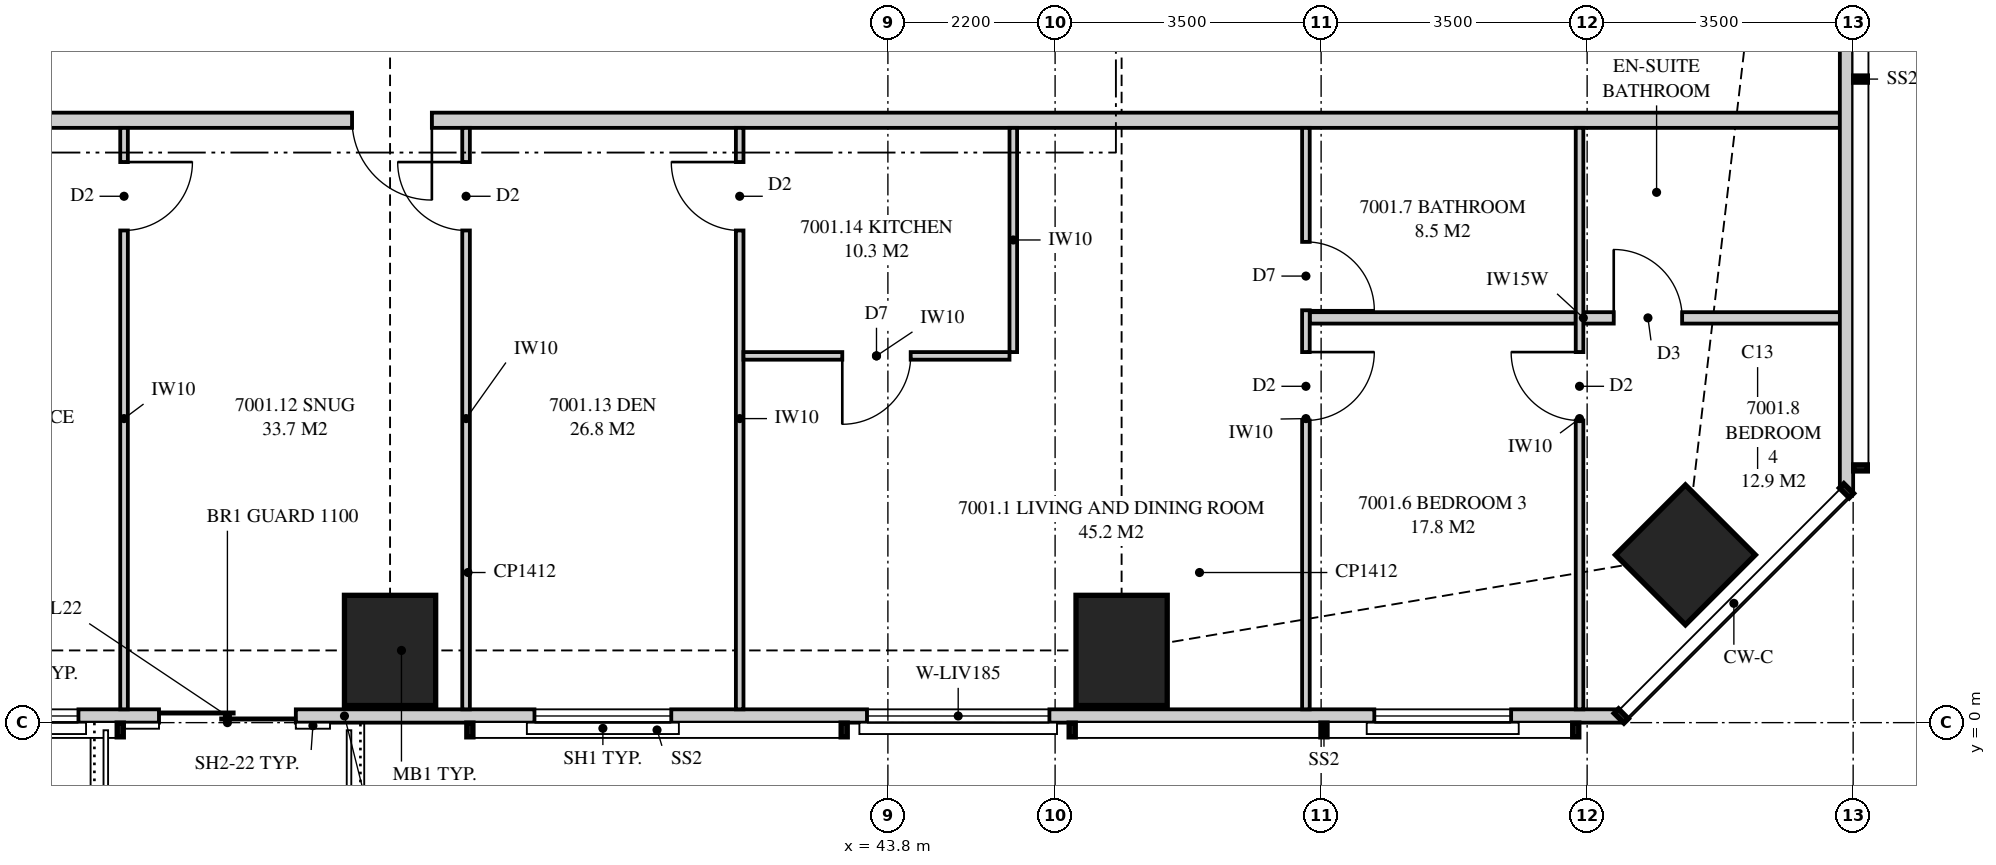
"""IFC4 building model, lengths in metres.
Left out: names, types, materials, properties, quantities, classifications, styles, units other than length and angle.
Written with IfcOpenShell. Run it as: python <this file> out.ifc"""

import sys

from ifc_helpers import new_model, si_unit, direction, frame, frame_2d, origin, origin_2d, place, context, subcontext, project, spatial, polyline, rectangle, outline, extrude, element, fill, save


model = new_model("IFC4")
c1 = context("Model", 3, precision=1e-05, world=origin(), true_north=direction((0.0, 1.0)))
c2 = subcontext(c1, "Body", "Model", "MODEL_VIEW")
j1 = project(units=[si_unit("LENGTHUNIT", "METRE"), si_unit("PLANEANGLEUNIT", "RADIAN")], contexts=[c1])
p1 = place(None, origin())
s1 = spatial("IfcSite", under=j1, at=p1, CompositionType="ELEMENT")
p2 = place(p1, origin())
s2 = spatial("IfcBuilding", under=s1, at=p2, CompositionType="ELEMENT")
p3 = place(p2, frame((0.0, 0.0, 256.45)))
s3 = spatial("IfcBuildingStorey", under=s2, at=p3, CompositionType="ELEMENT", Elevation=256.45)
for number, where, z_axis, x_axis in (
    (1, (37.25, 0.95, 0.0), (0.0, 0.0, 1.0), (0.0, 1.0, 0.0)),
    (2, (46.875, 0.95, 0.0), (0.0, 0.0, 1.0), (0.0, 1.0, 0.0)),
):
    element("IfcColumn", number, at=place(p3, frame(where, z_axis=z_axis, x_axis=x_axis)), inside=s3, PredefinedType="COLUMN", context=c2, shape_type="SweptSolid", body=[
        extrude(rectangle(XDim=1.45, YDim=1.2, at=origin_2d()), origin(), (0.0, 0.0, 1.0), 3.5),
    ])
p4 = place(p3, frame((54.293, 2.207, 0.0), z_axis=(0.0, 0.0, 1.0), x_axis=(0.707106781187, 0.707106781187, 0.0)))
e3 = element("IfcColumn", 3, at=p4, inside=s3, PredefinedType="COLUMN", context=c2, shape_type="SweptSolid", body=[
    extrude(rectangle(XDim=1.3, YDim=1.3, at=origin_2d()), origin(), (0.0, 0.0, 1.0), 3.5),
])
p5 = place(p3, frame((19.851, 0.087, 0.0), z_axis=(0.0, 0.0, 1.0), x_axis=(1.0, 0.0, 0.0)))
e4 = element("IfcWall", 4, at=p5, inside=s3, PredefinedType="SOLIDWALL", context=c2, shape_type="SweptSolid", body=[
    extrude(outline(polyline([(0.0, 0.0), (33.597, 0.0), (33.597, 3.26), (27.239, 3.26), (27.239, 2.3), (27.155, 2.3), (27.155, 3.26), (27.024, 3.26), (27.024, 2.3), (7.774, 2.3), (7.774, 3.26), (7.642, 3.26), (7.642, 2.3), (7.559, 2.3), (7.559, 3.26), (0.0, 3.26), (0.0, 0.0)])), frame((0.0, 0.087, 0.0), z_axis=(0.0, -1.0, 0.0), x_axis=(1.0, 0.0, 0.0)), (0.0, 0.0, 1.0), 0.175),
])
p6 = place(p5, frame((2.649, 0.0, 0.4)))
e5 = element("IfcOpeningElement", 5, at=p6, cuts=e4, PredefinedType="OPENING", context=c2, shape_type="SweptSolid", body=[
    extrude(rectangle(XDim=1.8, YDim=1.85, at=frame_2d((0.9, 0.925))), frame((0.0, 0.097, 0.0), z_axis=(0.0, -1.0, 0.0), x_axis=(1.0, 0.0, 0.0)), (0.0, 0.0, 1.0), 0.195),
])
p7 = place(p5, frame((8.625, 0.0, 0.4)))
e6 = element("IfcOpeningElement", 6, at=p7, cuts=e4, PredefinedType="OPENING", context=c2, shape_type="SweptSolid", body=[
    extrude(rectangle(XDim=1.8, YDim=1.85, at=frame_2d((0.9, 0.925))), frame((0.0, 0.097, 0.0), z_axis=(0.0, -1.0, 0.0), x_axis=(1.0, 0.0, 0.0)), (0.0, 0.0, 1.0), 0.195),
])
p8 = place(p5, frame((11.499, 0.0, 0.4)))
e7 = element("IfcOpeningElement", 7, at=p8, cuts=e4, PredefinedType="OPENING", context=c2, shape_type="SweptSolid", body=[
    extrude(rectangle(XDim=1.8, YDim=1.85, at=frame_2d((0.9, 0.925))), frame((0.0, 0.097, 0.0), z_axis=(0.0, -1.0, 0.0), x_axis=(1.0, 0.0, 0.0)), (0.0, 0.0, 1.0), 0.195),
])
p9 = place(p5, frame((14.359, 0.0, 0.0)))
e8 = element("IfcOpeningElement", 8, at=p9, cuts=e4, PredefinedType="OPENING", context=c2, shape_type="SweptSolid", body=[
    extrude(rectangle(XDim=1.8, YDim=2.25, at=frame_2d((0.9, 1.125))), frame((0.0, 0.097, 0.0), z_axis=(0.0, -1.0, 0.0), x_axis=(1.0, 0.0, 0.0)), (0.0, 0.0, 1.0), 0.195),
])
p10 = place(p5, frame((19.299, 0.0, 0.4)))
e9 = element("IfcOpeningElement", 9, at=p10, cuts=e4, PredefinedType="OPENING", context=c2, shape_type="SweptSolid", body=[
    extrude(rectangle(XDim=1.8, YDim=1.85, at=frame_2d((0.9, 0.925))), frame((0.0, 0.097, 0.0), z_axis=(0.0, -1.0, 0.0), x_axis=(1.0, 0.0, 0.0)), (0.0, 0.0, 1.0), 0.195),
])
p11 = place(p5, frame((23.674, 0.0, 0.4)))
e10 = element("IfcOpeningElement", 10, at=p11, cuts=e4, PredefinedType="OPENING", context=c2, shape_type="SweptSolid", body=[
    extrude(rectangle(XDim=2.4, YDim=1.85, at=frame_2d((1.2, 0.925))), frame((0.0, 0.097, 0.0), z_axis=(0.0, -1.0, 0.0), x_axis=(1.0, 0.0, 0.0)), (0.0, 0.0, 1.0), 0.195),
])
p12 = place(p5, frame((30.349, 0.0, 0.4)))
e11 = element("IfcOpeningElement", 11, at=p12, cuts=e4, PredefinedType="OPENING", context=c2, shape_type="SweptSolid", body=[
    extrude(rectangle(XDim=1.8, YDim=1.85, at=frame_2d((0.9, 0.925))), frame((0.0, 0.097, 0.0), z_axis=(0.0, -1.0, 0.0), x_axis=(1.0, 0.0, 0.0)), (0.0, 0.0, 1.0), 0.195),
])
p13 = place(p3, frame((56.413, 3.051, 0.0), z_axis=(0.0, 0.0, 1.0), x_axis=(0.0, 1.0, 0.0)))
e12 = element("IfcWall", 12, at=p13, inside=s3, PredefinedType="SOLIDWALL", context=c2, shape_type="SweptSolid", body=[
    extrude(outline(polyline([(0.0, 0.0), (27.897, 0.0), (27.897, 3.26), (22.157, 3.26), (22.157, 2.3), (22.092, 2.3), (22.092, 3.26), (21.949, 3.26), (21.949, 2.3), (9.949, 2.3), (9.949, 3.26), (9.858, 3.26), (9.858, 2.3), (9.688, 2.3), (9.688, 3.26), (0.0, 3.26), (0.0, 0.0)])), frame((0.0, 0.087, 0.0), z_axis=(0.0, -1.0, 0.0), x_axis=(1.0, 0.0, 0.0)), (0.0, 0.0, 1.0), 0.175),
])
p14 = place(p13, frame((10.831, 0.0, 0.4)))
e13 = element("IfcOpeningElement", 13, at=p14, cuts=e12, PredefinedType="OPENING", context=c2, shape_type="SweptSolid", body=[
    extrude(rectangle(XDim=2.4, YDim=1.85, at=frame_2d((1.2, 0.925))), frame((0.0, 0.097, 0.0), z_axis=(0.0, -1.0, 0.0), x_axis=(1.0, 0.0, 0.0)), (0.0, 0.0, 1.0), 0.195),
])
p15 = place(p13, frame((15.074, 0.0, 0.0)))
e14 = element("IfcOpeningElement", 14, at=p15, cuts=e12, PredefinedType="OPENING", context=c2, shape_type="SweptSolid", body=[
    extrude(rectangle(XDim=1.8, YDim=2.25, at=frame_2d((0.9, 1.125))), frame((0.0, 0.097, 0.0), z_axis=(0.0, -1.0, 0.0), x_axis=(1.0, 0.0, 0.0)), (0.0, 0.0, 1.0), 0.195),
])
p16 = place(p13, frame((18.699, 0.0, 0.4)))
e15 = element("IfcOpeningElement", 15, at=p16, cuts=e12, PredefinedType="OPENING", context=c2, shape_type="SweptSolid", body=[
    extrude(rectangle(XDim=2.4, YDim=1.85, at=frame_2d((1.2, 0.925))), frame((0.0, 0.097, 0.0), z_axis=(0.0, -1.0, 0.0), x_axis=(1.0, 0.0, 0.0)), (0.0, 0.0, 1.0), 0.195),
])
p17 = place(p3, frame((18.0, 7.925, 0.0), z_axis=(0.0, 0.0, 1.0), x_axis=(1.0, 0.0, 0.0)))
e16 = element("IfcWall", 16, at=p17, inside=s3, PredefinedType="PARTITIONING", context=c2, shape_type="SweptSolid", body=[
    extrude(outline(polyline([(0.0, 0.0), (38.325, 0.0), (38.325, 3.26), (37.875, 3.26), (37.875, 2.3), (36.043, 2.3), (36.043, 3.26), (30.185, 3.26), (30.185, 2.66), (27.565, 2.66), (27.565, 3.26), (20.56, 3.26), (20.56, 2.66), (17.94, 2.66), (17.94, 3.26), (10.935, 3.26), (10.935, 2.66), (8.315, 2.66), (8.315, 3.26), (1.839, 3.26), (1.839, 2.3), (0.0, 2.3), (0.0, 3.26), (0.0, 0.0)])), frame((0.0, 0.1, 0.0), z_axis=(0.0, -1.0, 0.0), x_axis=(1.0, 0.0, 0.0)), (0.0, 0.0, 1.0), 0.2),
])
p18 = place(p17, frame((18.75, 0.0, 0.0)))
e17 = element("IfcOpeningElement", 17, at=p18, cuts=e16, PredefinedType="OPENING", context=c2, shape_type="SweptSolid", body=[
    extrude(rectangle(XDim=1.05, YDim=2.2, at=frame_2d((0.525, 1.1))), frame((0.0, 0.11, 0.0), z_axis=(0.0, -1.0, 0.0), x_axis=(1.0, 0.0, 0.0)), (0.0, 0.0, 1.0), 0.22),
])
p19 = place(p3, frame((49.3, 0.175, 0.0), z_axis=(0.0, 0.0, 1.0), x_axis=(0.0, 1.0, 0.0)))
e18 = element("IfcWall", 18, at=p19, inside=s3, PredefinedType="PARTITIONING", context=c2, shape_type="SweptSolid", body=[
    extrude(outline(polyline([(0.0, 0.0), (7.65, 0.0), (7.65, 3.26), (2.058, 3.26), (2.058, 2.3), (0.314, 2.3), (0.314, 3.26), (0.0, 3.26), (0.0, 0.0)])), frame((0.0, 0.05, 0.0), z_axis=(0.0, -1.0, 0.0), x_axis=(1.0, 0.0, 0.0)), (0.0, 0.0, 1.0), 0.1),
])
p20 = place(p19, frame((3.8, 0.0, 0.0)))
e19 = element("IfcOpeningElement", 19, at=p20, cuts=e18, PredefinedType="OPENING", context=c2, shape_type="SweptSolid", body=[
    extrude(rectangle(XDim=0.9, YDim=2.1, at=frame_2d((0.45, 1.05))), frame((0.0, 0.06, 0.0), z_axis=(0.0, -1.0, 0.0), x_axis=(1.0, 0.0, 0.0)), (0.0, 0.0, 1.0), 0.12),
])
p21 = place(p19, frame((5.25, 0.0, 0.0)))
e20 = element("IfcOpeningElement", 20, at=p21, cuts=e18, PredefinedType="OPENING", context=c2, shape_type="SweptSolid", body=[
    extrude(rectangle(XDim=0.9, YDim=2.1, at=frame_2d((0.45, 1.05))), frame((0.0, 0.06, 0.0), z_axis=(0.0, -1.0, 0.0), x_axis=(1.0, 0.0, 0.0)), (0.0, 0.0, 1.0), 0.12),
])
p22 = place(p3, frame((52.9, 0.175, 0.0), z_axis=(0.0, 0.0, 1.0), x_axis=(0.0, 1.0, 0.0)))
e21 = element("IfcWall", 21, at=p22, inside=s3, PredefinedType="PARTITIONING", context=c2, shape_type="SweptSolid", body=[
    extrude(outline(polyline([(0.0, 0.0), (7.65, 0.0), (7.65, 3.26), (2.668, 3.26), (2.668, 2.3), (0.924, 2.3), (0.924, 3.26), (0.0, 3.26), (0.0, 0.0)])), frame((0.0, 0.05, 0.0), z_axis=(0.0, -1.0, 0.0), x_axis=(1.0, 0.0, 0.0)), (0.0, 0.0, 1.0), 0.1),
])
p23 = place(p22, frame((3.8, 0.0, 0.0)))
e22 = element("IfcOpeningElement", 22, at=p23, cuts=e21, PredefinedType="OPENING", context=c2, shape_type="SweptSolid", body=[
    extrude(rectangle(XDim=0.9, YDim=2.1, at=frame_2d((0.45, 1.05))), frame((0.0, 0.06, 0.0), z_axis=(0.0, -1.0, 0.0), x_axis=(1.0, 0.0, 0.0)), (0.0, 0.0, 1.0), 0.12),
])
p24 = place(p3, frame((49.35, 5.325, 0.0), z_axis=(0.0, 0.0, 1.0), x_axis=(1.0, 0.0, 0.0)))
e23 = element("IfcWall", 23, at=p24, inside=s3, PredefinedType="PLUMBINGWALL", context=c2, shape_type="SweptSolid", body=[
    extrude(rectangle(XDim=3.5, YDim=0.15, at=frame_2d((1.75, 0.0))), origin(), (0.0, 0.0, 1.0), 3.26),
])
p25 = place(p3, frame((52.95, 5.325, 0.0), z_axis=(0.0, 0.0, 1.0), x_axis=(1.0, 0.0, 0.0)))
e24 = element("IfcWall", 24, at=p25, inside=s3, PredefinedType="PLUMBINGWALL", context=c2, shape_type="SweptSolid", body=[
    extrude(outline(polyline([(0.0, 0.0), (3.55, 0.0), (3.55, 3.26), (2.597, 3.26), (2.597, 2.3), (0.815, 2.3), (0.815, 3.26), (0.0, 3.26), (0.0, 0.0)])), frame((0.0, 0.075, 0.0), z_axis=(0.0, -1.0, 0.0), x_axis=(1.0, 0.0, 0.0)), (0.0, 0.0, 1.0), 0.15),
])
p26 = place(p25, frame((0.4, 0.0, 0.0)))
e25 = element("IfcOpeningElement", 25, at=p26, cuts=e24, PredefinedType="OPENING", context=c2, shape_type="SweptSolid", body=[
    extrude(rectangle(XDim=0.9, YDim=2.1, at=frame_2d((0.45, 1.05))), frame((0.0, 0.085, 0.0), z_axis=(0.0, -1.0, 0.0), x_axis=(1.0, 0.0, 0.0)), (0.0, 0.0, 1.0), 0.17),
])
p27 = place(p3, frame((33.75, 0.175, 0.0), z_axis=(0.0, 0.0, 1.0), x_axis=(0.0, 1.0, 0.0)))
e26 = element("IfcWall", 26, at=p27, inside=s3, PredefinedType="PARTITIONING", context=c2, shape_type="SweptSolid", body=[
    extrude(outline(polyline([(0.0, 0.0), (7.65, 0.0), (7.65, 3.26), (1.635, 3.26), (1.635, 2.3), (0.0, 2.3), (0.0, 3.26), (0.0, 0.0)])), frame((0.0, 0.05, 0.0), z_axis=(0.0, -1.0, 0.0), x_axis=(1.0, 0.0, 0.0)), (0.0, 0.0, 1.0), 0.1),
])
p28 = place(p27, frame((6.3, 0.0, 0.0)))
e27 = element("IfcOpeningElement", 27, at=p28, cuts=e26, PredefinedType="OPENING", context=c2, shape_type="SweptSolid", body=[
    extrude(rectangle(XDim=0.9, YDim=2.1, at=frame_2d((0.45, 1.05))), frame((0.0, 0.06, 0.0), z_axis=(0.0, -1.0, 0.0), x_axis=(1.0, 0.0, 0.0)), (0.0, 0.0, 1.0), 0.12),
])
p29 = place(p3, frame((38.25, 0.175, 0.0), z_axis=(0.0, 0.0, 1.0), x_axis=(0.0, 1.0, 0.0)))
e28 = element("IfcWall", 28, at=p29, inside=s3, PredefinedType="PARTITIONING", context=c2, shape_type="SweptSolid", body=[
    extrude(outline(polyline([(0.0, 0.0), (7.65, 0.0), (7.65, 3.26), (7.65, 2.66), (1.635, 2.66), (1.635, 2.3), (0.0, 2.3), (0.0, 3.26), (0.0, 0.0)])), frame((0.0, 0.05, 0.0), z_axis=(0.0, -1.0, 0.0), x_axis=(1.0, 0.0, 0.0)), (0.0, 0.0, 1.0), 0.1),
])
p30 = place(p29, frame((6.3, 0.0, 0.0)))
e29 = element("IfcOpeningElement", 29, at=p30, cuts=e28, PredefinedType="OPENING", context=c2, shape_type="SweptSolid", body=[
    extrude(rectangle(XDim=0.9, YDim=2.1, at=frame_2d((0.45, 1.05))), frame((0.0, 0.06, 0.0), z_axis=(0.0, -1.0, 0.0), x_axis=(1.0, 0.0, 0.0)), (0.0, 0.0, 1.0), 0.12),
])
p31 = place(p3, frame((41.85, 0.175, 0.0), z_axis=(0.0, 0.0, 1.0), x_axis=(0.0, 1.0, 0.0)))
e30 = element("IfcWall", 30, at=p31, inside=s3, PredefinedType="PARTITIONING", context=c2, shape_type="SweptSolid", body=[
    extrude(outline(polyline([(0.0, 0.0), (7.65, 0.0), (7.65, 3.26), (1.635, 3.26), (1.635, 2.3), (0.0, 2.3), (0.0, 3.26), (0.0, 0.0)])), frame((0.0, 0.05, 0.0), z_axis=(0.0, -1.0, 0.0), x_axis=(1.0, 0.0, 0.0)), (0.0, 0.0, 1.0), 0.1),
])
p32 = place(p31, frame((6.3, 0.0, 0.0)))
e31 = element("IfcOpeningElement", 31, at=p32, cuts=e30, PredefinedType="OPENING", context=c2, shape_type="SweptSolid", body=[
    extrude(rectangle(XDim=0.9, YDim=2.1, at=frame_2d((0.45, 1.05))), frame((0.0, 0.06, 0.0), z_axis=(0.0, -1.0, 0.0), x_axis=(1.0, 0.0, 0.0)), (0.0, 0.0, 1.0), 0.12),
])
p33 = place(p3, frame((41.9, 4.825, 0.0), z_axis=(0.0, 0.0, 1.0), x_axis=(1.0, 0.0, 0.0)))
e32 = element("IfcWall", 32, at=p33, inside=s3, PredefinedType="PARTITIONING", context=c2, shape_type="SweptSolid", body=[
    extrude(rectangle(XDim=3.5, YDim=0.1, at=frame_2d((1.75, 0.0))), origin(), (0.0, 0.0, 1.0), 3.26),
])
p34 = place(p33, frame((1.3, 0.0, 0.0)))
e33 = element("IfcOpeningElement", 33, at=p34, cuts=e32, PredefinedType="OPENING", context=c2, shape_type="SweptSolid", body=[
    extrude(rectangle(XDim=0.9, YDim=2.1, at=frame_2d((0.45, 1.05))), frame((0.0, 0.06, 0.0), z_axis=(0.0, -1.0, 0.0), x_axis=(1.0, 0.0, 0.0)), (0.0, 0.0, 1.0), 0.12),
])
p35 = place(p3, frame((45.45, 4.875, 0.0), z_axis=(0.0, 0.0, 1.0), x_axis=(0.0, 1.0, 0.0)))
e34 = element("IfcWall", 34, at=p35, inside=s3, PredefinedType="PARTITIONING", context=c2, shape_type="SweptSolid", body=[
    extrude(rectangle(XDim=2.95, YDim=0.1, at=frame_2d((1.475, 0.0))), origin(), (0.0, 0.0, 1.0), 3.26),
])
p36 = place(p8, origin())
e35 = element("IfcWindow", 35, at=p36, inside=s3, PartitioningType="SINGLE_PANEL", PredefinedType="WINDOW", context=c2, shape_type="SweptSolid", body=[
    extrude(rectangle(XDim=1.8, YDim=1.85, at=frame_2d((0.9, 0.925))), frame((0.0, 0.03, 0.0), z_axis=(0.0, -1.0, 0.0), x_axis=(1.0, 0.0, 0.0)), (0.0, 0.0, 1.0), 0.06),
])
fill(e7, e35)
p37 = place(p9, origin())
e36 = element("IfcDoor", 36, at=p37, inside=s3, OperationType="SLIDING_TO_LEFT", PredefinedType="DOOR", context=c2, shape_type="SweptSolid", body=[
    extrude(rectangle(XDim=1.8, YDim=2.25, at=frame_2d((0.9, 1.125))), frame((0.0, 0.025, 0.0), z_axis=(0.0, -1.0, 0.0), x_axis=(1.0, 0.0, 0.0)), (0.0, 0.0, 1.0), 0.05),
])
fill(e8, e36)
p38 = place(p10, origin())
e37 = element("IfcWindow", 37, at=p38, inside=s3, PartitioningType="SINGLE_PANEL", PredefinedType="WINDOW", context=c2, shape_type="SweptSolid", body=[
    extrude(rectangle(XDim=1.8, YDim=1.85, at=frame_2d((0.9, 0.925))), frame((0.0, 0.03, 0.0), z_axis=(0.0, -1.0, 0.0), x_axis=(1.0, 0.0, 0.0)), (0.0, 0.0, 1.0), 0.06),
])
fill(e9, e37)
p39 = place(p11, origin())
e38 = element("IfcWindow", 38, at=p39, inside=s3, PartitioningType="SINGLE_PANEL", PredefinedType="WINDOW", context=c2, shape_type="SweptSolid", body=[
    extrude(rectangle(XDim=2.4, YDim=1.85, at=frame_2d((1.2, 0.925))), frame((0.0, 0.03, 0.0), z_axis=(0.0, -1.0, 0.0), x_axis=(1.0, 0.0, 0.0)), (0.0, 0.0, 1.0), 0.06),
])
fill(e10, e38)
p40 = place(p12, origin())
e39 = element("IfcWindow", 39, at=p40, inside=s3, PartitioningType="SINGLE_PANEL", PredefinedType="WINDOW", context=c2, shape_type="SweptSolid", body=[
    extrude(rectangle(XDim=1.8, YDim=1.85, at=frame_2d((0.9, 0.925))), frame((0.0, 0.03, 0.0), z_axis=(0.0, -1.0, 0.0), x_axis=(1.0, 0.0, 0.0)), (0.0, 0.0, 1.0), 0.06),
])
fill(e11, e39)
p41 = place(p18, frame((1.05, 0.0, 0.0), z_axis=(0.0, 0.0, 1.0), x_axis=(-1.0, 0.0, 0.0)))
e40 = element("IfcDoor", 40, at=p41, inside=s3, OperationType="SINGLE_SWING_LEFT", PredefinedType="DOOR", context=c2, shape_type="SweptSolid", body=[
    extrude(rectangle(XDim=1.05, YDim=2.2, at=frame_2d((0.525, 1.1))), frame((0.0, 0.025, 0.0), z_axis=(0.0, -1.0, 0.0), x_axis=(1.0, 0.0, 0.0)), (0.0, 0.0, 1.0), 0.05),
])
fill(e17, e40)
p42 = place(p20, frame((0.9, 0.0, 0.0), z_axis=(0.0, 0.0, 1.0), x_axis=(-1.0, 0.0, 0.0)))
e41 = element("IfcDoor", 41, at=p42, inside=s3, OperationType="SINGLE_SWING_LEFT", PredefinedType="DOOR", context=c2, shape_type="SweptSolid", body=[
    extrude(rectangle(XDim=0.9, YDim=2.1, at=frame_2d((0.45, 1.05))), frame((0.0, 0.025, 0.0), z_axis=(0.0, -1.0, 0.0), x_axis=(1.0, 0.0, 0.0)), (0.0, 0.0, 1.0), 0.05),
])
fill(e19, e41)
p43 = place(p21, frame((0.9, 0.0, 0.0), z_axis=(0.0, 0.0, 1.0), x_axis=(-1.0, 0.0, 0.0)))
e42 = element("IfcDoor", 42, at=p43, inside=s3, OperationType="SINGLE_SWING_RIGHT", PredefinedType="DOOR", context=c2, shape_type="SweptSolid", body=[
    extrude(rectangle(XDim=0.9, YDim=2.1, at=frame_2d((0.45, 1.05))), frame((0.0, 0.025, 0.0), z_axis=(0.0, -1.0, 0.0), x_axis=(1.0, 0.0, 0.0)), (0.0, 0.0, 1.0), 0.05),
])
fill(e20, e42)
p44 = place(p23, origin())
e43 = element("IfcDoor", 43, at=p44, inside=s3, OperationType="SINGLE_SWING_RIGHT", PredefinedType="DOOR", context=c2, shape_type="SweptSolid", body=[
    extrude(rectangle(XDim=0.9, YDim=2.1, at=frame_2d((0.45, 1.05))), frame((0.0, 0.025, 0.0), z_axis=(0.0, -1.0, 0.0), x_axis=(1.0, 0.0, 0.0)), (0.0, 0.0, 1.0), 0.05),
])
fill(e22, e43)
p45 = place(p26, origin())
e44 = element("IfcDoor", 44, at=p45, inside=s3, OperationType="SINGLE_SWING_LEFT", PredefinedType="DOOR", context=c2, shape_type="SweptSolid", body=[
    extrude(rectangle(XDim=0.9, YDim=2.1, at=frame_2d((0.45, 1.05))), frame((0.0, 0.025, 0.0), z_axis=(0.0, -1.0, 0.0), x_axis=(1.0, 0.0, 0.0)), (0.0, 0.0, 1.0), 0.05),
])
fill(e25, e44)
p46 = place(p28, frame((0.9, 0.0, 0.0), z_axis=(0.0, 0.0, 1.0), x_axis=(-1.0, 0.0, 0.0)))
e45 = element("IfcDoor", 45, at=p46, inside=s3, OperationType="SINGLE_SWING_LEFT", PredefinedType="DOOR", context=c2, shape_type="SweptSolid", body=[
    extrude(rectangle(XDim=0.9, YDim=2.1, at=frame_2d((0.45, 1.05))), frame((0.0, 0.025, 0.0), z_axis=(0.0, -1.0, 0.0), x_axis=(1.0, 0.0, 0.0)), (0.0, 0.0, 1.0), 0.05),
])
fill(e27, e45)
p47 = place(p30, origin())
e46 = element("IfcDoor", 46, at=p47, inside=s3, OperationType="SINGLE_SWING_RIGHT", PredefinedType="DOOR", context=c2, shape_type="SweptSolid", body=[
    extrude(rectangle(XDim=0.9, YDim=2.1, at=frame_2d((0.45, 1.05))), frame((0.0, 0.025, 0.0), z_axis=(0.0, -1.0, 0.0), x_axis=(1.0, 0.0, 0.0)), (0.0, 0.0, 1.0), 0.05),
])
fill(e29, e46)
p48 = place(p32, origin())
e47 = element("IfcDoor", 47, at=p48, inside=s3, OperationType="SINGLE_SWING_RIGHT", PredefinedType="DOOR", context=c2, shape_type="SweptSolid", body=[
    extrude(rectangle(XDim=0.9, YDim=2.1, at=frame_2d((0.45, 1.05))), frame((0.0, 0.025, 0.0), z_axis=(0.0, -1.0, 0.0), x_axis=(1.0, 0.0, 0.0)), (0.0, 0.0, 1.0), 0.05),
])
fill(e31, e47)
p49 = place(p34, frame((0.9, 0.0, 0.0), z_axis=(0.0, 0.0, 1.0), x_axis=(-1.0, 0.0, 0.0)))
e48 = element("IfcDoor", 48, at=p49, inside=s3, OperationType="SINGLE_SWING_RIGHT", PredefinedType="DOOR", context=c2, shape_type="SweptSolid", body=[
    extrude(rectangle(XDim=0.9, YDim=2.1, at=frame_2d((0.45, 1.05))), frame((0.0, 0.025, 0.0), z_axis=(0.0, -1.0, 0.0), x_axis=(1.0, 0.0, 0.0)), (0.0, 0.0, 1.0), 0.05),
])
fill(e33, e48)
save(model, sys.argv[1])
